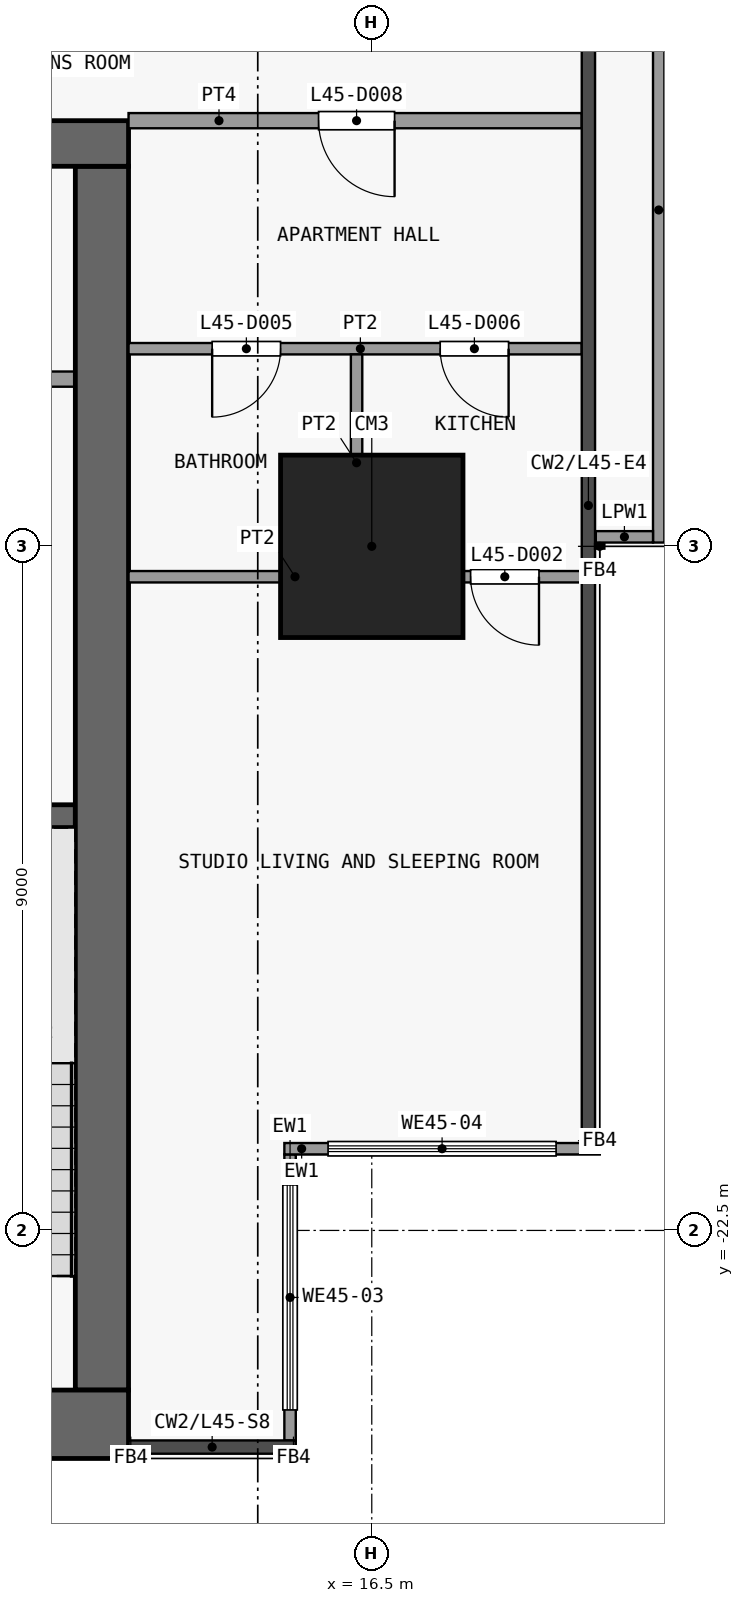
"""IFC4 building model, lengths in metres.
Left out: names, types, materials, properties, quantities, classifications, styles, units other than length and angle.
Written with IfcOpenShell. Run it as: python <this file> out.ifc"""

import sys

from ifc_helpers import new_model, si_unit, direction, frame, frame_2d, origin, origin_2d, place, context, subcontext, project, spatial, rectangle, extrude, element, fill, save


model = new_model("IFC4")
c1 = context("Model", 3, precision=1e-05, world=origin(), true_north=direction((0.0, 1.0)))
c2 = subcontext(c1, "Body", "Model", "MODEL_VIEW")
j1 = project(units=[si_unit("LENGTHUNIT", "METRE"), si_unit("PLANEANGLEUNIT", "RADIAN")], contexts=[c1])
p1 = place(None, origin())
s1 = spatial("IfcSite", under=j1, at=p1, CompositionType="ELEMENT")
p2 = place(p1, origin())
s2 = spatial("IfcBuilding", under=s1, at=p2, CompositionType="ELEMENT")
p3 = place(p2, frame((0.0, 0.0, 181.7)))
s3 = spatial("IfcBuildingStorey", under=s2, at=p3, CompositionType="ELEMENT", Elevation=181.7)
p4 = place(p3, frame((16.5, -13.5, 0.0), z_axis=(0.0, 0.0, 1.0), x_axis=(1.0, 0.0, 0.0)))
e1 = element("IfcColumn", 1, at=p4, inside=s3, PredefinedType="COLUMN", context=c2, shape_type="SweptSolid", body=[
    extrude(rectangle(XDim=2.4, YDim=2.4, at=origin_2d()), origin(), (0.0, 0.0, 1.0), 3.6),
])
p5 = place(p3, frame((-13.3, -25.05, 0.0), z_axis=(0.0, 0.0, 1.0), x_axis=(1.0, 0.0, 0.0)))
e2 = element("IfcWall", 2, at=p5, inside=s3, PredefinedType="SHEAR", context=c2, shape_type="SweptSolid", body=[
    extrude(rectangle(XDim=26.6, YDim=0.9, at=frame_2d((13.3, 0.0))), origin(), (0.0, 0.0, 1.0), 3.3),
])
p6 = place(p3, frame((-13.3, -8.2, 0.0), z_axis=(0.0, 0.0, 1.0), x_axis=(1.0, 0.0, 0.0)))
e3 = element("IfcWall", 3, at=p6, inside=s3, PredefinedType="SHEAR", context=c2, shape_type="SweptSolid", body=[
    extrude(rectangle(XDim=26.6, YDim=0.6, at=frame_2d((13.3, 0.0))), origin(), (0.0, 0.0, 1.0), 3.3),
])
p7 = place(p6, frame((7.6, 0.0, 0.0)))
e4 = element("IfcOpeningElement", 4, at=p7, cuts=e3, PredefinedType="OPENING", context=c2, shape_type="SweptSolid", body=[
    extrude(rectangle(XDim=1.8, YDim=2.1, at=frame_2d((0.9, 1.05))), frame((0.0, 0.31, 0.0), z_axis=(0.0, -1.0, 0.0), x_axis=(1.0, 0.0, 0.0)), (0.0, 0.0, 1.0), 0.62),
])
p8 = place(p6, frame((17.2, 0.0, 0.0)))
e5 = element("IfcOpeningElement", 5, at=p8, cuts=e3, PredefinedType="OPENING", context=c2, shape_type="SweptSolid", body=[
    extrude(rectangle(XDim=1.8, YDim=2.1, at=frame_2d((0.9, 1.05))), frame((0.0, 0.31, 0.0), z_axis=(0.0, -1.0, 0.0), x_axis=(1.0, 0.0, 0.0)), (0.0, 0.0, 1.0), 0.62),
])
p9 = place(p6, frame((2.525, 0.0, 0.0)))
e6 = element("IfcOpeningElement", 6, at=p9, cuts=e3, PredefinedType="OPENING", context=c2, shape_type="SweptSolid", body=[
    extrude(rectangle(XDim=0.9, YDim=2.1, at=frame_2d((0.45, 1.05))), frame((0.0, 0.31, 0.0), z_axis=(0.0, -1.0, 0.0), x_axis=(1.0, 0.0, 0.0)), (0.0, 0.0, 1.0), 0.62),
])
p10 = place(p6, frame((23.175, 0.0, 0.0)))
e7 = element("IfcOpeningElement", 7, at=p10, cuts=e3, PredefinedType="OPENING", context=c2, shape_type="SweptSolid", body=[
    extrude(rectangle(XDim=0.9, YDim=2.1, at=frame_2d((0.45, 1.05))), frame((0.0, 0.31, 0.0), z_axis=(0.0, -1.0, 0.0), x_axis=(1.0, 0.0, 0.0)), (0.0, 0.0, 1.0), 0.62),
])
p11 = place(p3, frame((12.95, -24.6, 0.0), z_axis=(0.0, 0.0, 1.0), x_axis=(0.0, 1.0, 0.0)))
e8 = element("IfcWall", 8, at=p11, inside=s3, PredefinedType="SHEAR", context=c2, shape_type="SweptSolid", body=[
    extrude(rectangle(XDim=16.1, YDim=0.7, at=frame_2d((8.05, 0.0))), origin(), (0.0, 0.0, 1.0), 3.3),
])
p12 = place(p3, frame((9.5, -17.05, 0.0), z_axis=(0.0, 0.0, 1.0), x_axis=(1.0, 0.0, 0.0)))
e9 = element("IfcWall", 9, at=p12, inside=s3, PredefinedType="SHEAR", context=c2, shape_type="SweptSolid", body=[
    extrude(rectangle(XDim=3.1, YDim=0.3, at=frame_2d((1.55, 0.0))), origin(), (0.0, 0.0, 1.0), 3.3),
])
p13 = place(p3, frame((11.15, -11.3, 0.0), z_axis=(0.0, 0.0, 1.0), x_axis=(1.0, 0.0, 0.0)))
e10 = element("IfcWall", 10, at=p13, inside=s3, PredefinedType="PARTITIONING", context=c2, shape_type="SweptSolid", body=[
    extrude(rectangle(XDim=1.45, YDim=0.2, at=frame_2d((0.725, 0.0))), origin(), (0.0, 0.0, 1.0), 3.3),
])
p14 = place(p3, frame((15.425, -21.5, 0.0), z_axis=(0.0, 0.0, 1.0), x_axis=(0.0, -1.0, 0.0)))
e11 = element("IfcWall", 11, at=p14, inside=s3, PredefinedType="SOLIDWALL", context=c2, shape_type="SweptSolid", body=[
    extrude(rectangle(XDim=3.762, YDim=0.15, at=frame_2d((1.881, 0.0))), origin(), (0.0, 0.0, 1.0), 3.3),
])
p15 = place(p14, frame((0.401, 0.0, 0.9)))
e12 = element("IfcOpeningElement", 12, at=p15, cuts=e11, PredefinedType="OPENING", context=c2, shape_type="SweptSolid", body=[
    extrude(rectangle(XDim=2.96, YDim=2.4, at=frame_2d((1.48, 1.2))), frame((0.0, 0.085, 0.0), z_axis=(0.0, -1.0, 0.0), x_axis=(1.0, 0.0, 0.0)), (0.0, 0.0, 1.0), 0.17),
])
p16 = place(p3, frame((19.5, -21.425, 0.0), z_axis=(0.0, 0.0, 1.0), x_axis=(-1.0, 0.0, 0.0)))
e13 = element("IfcWall", 13, at=p16, inside=s3, PredefinedType="SOLIDWALL", context=c2, shape_type="SweptSolid", body=[
    extrude(rectangle(XDim=4.15, YDim=0.15, at=frame_2d((2.075, 0.0))), origin(), (0.0, 0.0, 1.0), 3.3),
])
p17 = place(p16, frame((0.575, 0.0, 0.9)))
e14 = element("IfcOpeningElement", 14, at=p17, cuts=e13, PredefinedType="OPENING", context=c2, shape_type="SweptSolid", body=[
    extrude(rectangle(XDim=3.0, YDim=2.4, at=frame_2d((1.5, 1.2))), frame((0.0, 0.085, 0.0), z_axis=(0.0, -1.0, 0.0), x_axis=(1.0, 0.0, 0.0)), (0.0, 0.0, 1.0), 0.17),
])
p18 = place(p3, frame((20.275, -4.7, 0.0), z_axis=(0.0, 0.0, 1.0), x_axis=(0.0, -1.0, 0.0)))
e15 = element("IfcWall", 15, at=p18, inside=s3, PredefinedType="PARAPET", context=c2, shape_type="SweptSolid", body=[
    extrude(rectangle(XDim=8.75, YDim=0.15, at=frame_2d((4.375, 0.0))), origin(), (0.0, 0.0, 1.0), 1.15),
])
p19 = place(p3, frame((20.2, -13.375, 0.0), z_axis=(0.0, 0.0, 1.0), x_axis=(-1.0, 0.0, 0.0)))
e16 = element("IfcWall", 16, at=p19, inside=s3, PredefinedType="PARAPET", context=c2, shape_type="SweptSolid", body=[
    extrude(rectangle(XDim=0.752, YDim=0.15, at=frame_2d((0.376, 0.0))), origin(), (0.0, 0.0, 1.0), 1.15),
])
p20 = place(p3, frame((13.3, -13.9, 0.0), z_axis=(0.0, 0.0, 1.0), x_axis=(1.0, 0.0, 0.0)))
e17 = element("IfcWall", 17, at=p20, inside=s3, PredefinedType="PARTITIONING", context=c2, shape_type="SweptSolid", body=[
    extrude(rectangle(XDim=5.962, YDim=0.15, at=frame_2d((2.981, 0.0))), origin(), (0.0, 0.0, 1.0), 3.3),
])
p21 = place(p20, frame((4.5, 0.0, 0.0)))
e18 = element("IfcOpeningElement", 18, at=p21, cuts=e17, PredefinedType="OPENING", context=c2, shape_type="SweptSolid", body=[
    extrude(rectangle(XDim=0.9, YDim=2.1, at=frame_2d((0.45, 1.05))), frame((0.0, 0.085, 0.0), z_axis=(0.0, -1.0, 0.0), x_axis=(1.0, 0.0, 0.0)), (0.0, 0.0, 1.0), 0.17),
])
p22 = place(p3, frame((13.3, -10.9, 0.0), z_axis=(0.0, 0.0, 1.0), x_axis=(1.0, 0.0, 0.0)))
e19 = element("IfcWall", 19, at=p22, inside=s3, PredefinedType="PARTITIONING", context=c2, shape_type="SweptSolid", body=[
    extrude(rectangle(XDim=5.962, YDim=0.15, at=frame_2d((2.981, 0.0))), origin(), (0.0, 0.0, 1.0), 3.3),
])
p23 = place(p22, frame((1.1, 0.0, 0.0)))
e20 = element("IfcOpeningElement", 20, at=p23, cuts=e19, PredefinedType="OPENING", context=c2, shape_type="SweptSolid", body=[
    extrude(rectangle(XDim=0.9, YDim=2.1, at=frame_2d((0.45, 1.05))), frame((0.0, 0.085, 0.0), z_axis=(0.0, -1.0, 0.0), x_axis=(1.0, 0.0, 0.0)), (0.0, 0.0, 1.0), 0.17),
])
p24 = place(p22, frame((4.1, 0.0, 0.0)))
e21 = element("IfcOpeningElement", 21, at=p24, cuts=e19, PredefinedType="OPENING", context=c2, shape_type="SweptSolid", body=[
    extrude(rectangle(XDim=0.9, YDim=2.1, at=frame_2d((0.45, 1.05))), frame((0.0, 0.085, 0.0), z_axis=(0.0, -1.0, 0.0), x_axis=(1.0, 0.0, 0.0)), (0.0, 0.0, 1.0), 0.17),
])
p25 = place(p3, frame((13.3, -7.9, 0.0), z_axis=(0.0, 0.0, 1.0), x_axis=(1.0, 0.0, 0.0)))
e22 = element("IfcWall", 22, at=p25, inside=s3, PredefinedType="PARTITIONING", context=c2, shape_type="SweptSolid", body=[
    extrude(rectangle(XDim=5.962, YDim=0.2, at=frame_2d((2.981, 0.0))), origin(), (0.0, 0.0, 1.0), 3.3),
])
p26 = place(p25, frame((2.5, 0.0, 0.0)))
e23 = element("IfcOpeningElement", 23, at=p26, cuts=e22, PredefinedType="OPENING", context=c2, shape_type="SweptSolid", body=[
    extrude(rectangle(XDim=1.0, YDim=2.1, at=frame_2d((0.5, 1.05))), frame((0.0, 0.11, 0.0), z_axis=(0.0, -1.0, 0.0), x_axis=(1.0, 0.0, 0.0)), (0.0, 0.0, 1.0), 0.22),
])
p27 = place(p3, frame((16.3, -13.825, 0.0), z_axis=(0.0, 0.0, 1.0), x_axis=(0.0, 1.0, 0.0)))
e24 = element("IfcWall", 24, at=p27, inside=s3, PredefinedType="PARTITIONING", context=c2, shape_type="SweptSolid", body=[
    extrude(rectangle(XDim=2.85, YDim=0.15, at=frame_2d((1.425, 0.0))), origin(), (0.0, 0.0, 1.0), 3.3),
])
p28 = place(p15, origin())
e25 = element("IfcWindow", 25, at=p28, inside=s3, PartitioningType="SINGLE_PANEL", PredefinedType="WINDOW", context=c2, shape_type="SweptSolid", body=[
    extrude(rectangle(XDim=2.96, YDim=2.4, at=frame_2d((1.48, 1.2))), frame((0.0, 0.03, 0.0), z_axis=(0.0, -1.0, 0.0), x_axis=(1.0, 0.0, 0.0)), (0.0, 0.0, 1.0), 0.06),
])
fill(e12, e25)
p29 = place(p17, origin())
e26 = element("IfcWindow", 26, at=p29, inside=s3, PartitioningType="SINGLE_PANEL", PredefinedType="WINDOW", context=c2, shape_type="SweptSolid", body=[
    extrude(rectangle(XDim=3.0, YDim=2.4, at=frame_2d((1.5, 1.2))), frame((0.0, 0.03, 0.0), z_axis=(0.0, -1.0, 0.0), x_axis=(1.0, 0.0, 0.0)), (0.0, 0.0, 1.0), 0.06),
])
fill(e14, e26)
p30 = place(p21, origin())
e27 = element("IfcDoor", 27, at=p30, inside=s3, OperationType="SINGLE_SWING_RIGHT", PredefinedType="DOOR", context=c2, shape_type="SweptSolid", body=[
    extrude(rectangle(XDim=0.9, YDim=2.1, at=frame_2d((0.45, 1.05))), frame((0.0, 0.025, 0.0), z_axis=(0.0, -1.0, 0.0), x_axis=(1.0, 0.0, 0.0)), (0.0, 0.0, 1.0), 0.05),
])
fill(e18, e27)
p31 = place(p23, origin())
e28 = element("IfcDoor", 28, at=p31, inside=s3, OperationType="SINGLE_SWING_LEFT", PredefinedType="DOOR", context=c2, shape_type="SweptSolid", body=[
    extrude(rectangle(XDim=0.9, YDim=2.1, at=frame_2d((0.45, 1.05))), frame((0.0, 0.025, 0.0), z_axis=(0.0, -1.0, 0.0), x_axis=(1.0, 0.0, 0.0)), (0.0, 0.0, 1.0), 0.05),
])
fill(e20, e28)
p32 = place(p24, origin())
e29 = element("IfcDoor", 29, at=p32, inside=s3, OperationType="SINGLE_SWING_RIGHT", PredefinedType="DOOR", context=c2, shape_type="SweptSolid", body=[
    extrude(rectangle(XDim=0.9, YDim=2.1, at=frame_2d((0.45, 1.05))), frame((0.0, 0.025, 0.0), z_axis=(0.0, -1.0, 0.0), x_axis=(1.0, 0.0, 0.0)), (0.0, 0.0, 1.0), 0.05),
])
fill(e21, e29)
p33 = place(p26, origin())
e30 = element("IfcDoor", 30, at=p33, inside=s3, OperationType="SINGLE_SWING_RIGHT", PredefinedType="DOOR", context=c2, shape_type="SweptSolid", body=[
    extrude(rectangle(XDim=1.0, YDim=2.1, at=frame_2d((0.5, 1.05))), frame((0.0, 0.025, 0.0), z_axis=(0.0, -1.0, 0.0), x_axis=(1.0, 0.0, 0.0)), (0.0, 0.0, 1.0), 0.05),
])
fill(e23, e30)
save(model, sys.argv[1])
